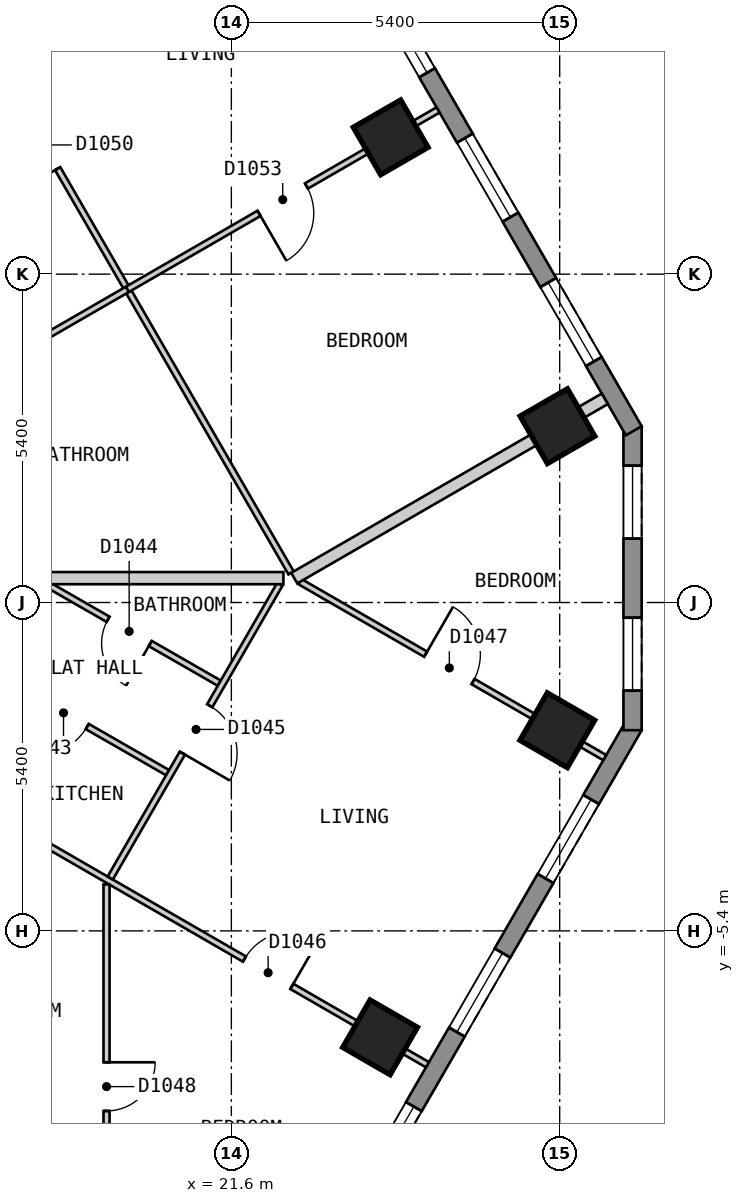
"""IFC4 building model, lengths in metres.
Left out: names, types, materials, properties, quantities, classifications, styles, units other than length and angle.
Written with IfcOpenShell. Run it as: python <this file> out.ifc"""

import sys

from ifc_helpers import new_model, si_unit, direction, frame, frame_2d, origin, origin_2d, place, context, subcontext, project, spatial, polyline, rectangle, outline, extrude, element, fill, save


model = new_model("IFC4")
c1 = context("Model", 3, precision=1e-05, world=origin(), true_north=direction((0.0, 1.0)))
c2 = subcontext(c1, "Body", "Model", "MODEL_VIEW")
j1 = project(units=[si_unit("LENGTHUNIT", "METRE"), si_unit("PLANEANGLEUNIT", "RADIAN")], contexts=[c1])
p1 = place(None, origin())
s1 = spatial("IfcSite", under=j1, at=p1, CompositionType="ELEMENT")
p2 = place(p1, origin())
s2 = spatial("IfcBuilding", under=s1, at=p2, CompositionType="ELEMENT")
p3 = place(p2, frame((0.0, 0.0, 120.6)))
s3 = spatial("IfcBuildingStorey", under=s2, at=p3, CompositionType="ELEMENT", Elevation=120.6)
for number, where, z_axis, x_axis in (
    (1, (24.046, -7.151, 0.0), (0.0, 0.0, 1.0), (0.5, 0.866, 0.0)),
    (2, (26.961, -2.101, 0.0), (0.0, 0.0, 1.0), (0.5, 0.866, 0.0)),
    (3, (26.963, 2.9, 0.0), (0.0, 0.0, 1.0), (-0.5, 0.866, 0.0)),
    (4, (24.22, 7.65, 0.0), (0.0, 0.0, 1.0), (-0.5, 0.866, 0.0)),
):
    element("IfcColumn", number, at=place(p3, frame(where, z_axis=z_axis, x_axis=x_axis)), inside=s3, PredefinedType="COLUMN", context=c2, shape_type="SweptSolid", body=[
        extrude(rectangle(XDim=0.9, YDim=0.9, at=origin_2d()), origin(), (0.0, 0.0, 1.0), 3.0),
    ])
p4 = place(p3, frame((15.862, -23.425, 0.0), z_axis=(0.0, 0.0, 1.0), x_axis=(0.500017503135, 0.866015298109, 0.0)))
e5 = element("IfcWall", 5, at=p4, inside=s3, PredefinedType="SOLIDWALL", context=c2, shape_type="SweptSolid", body=[
    extrude(outline(polyline([(0.0, -0.15), (24.711, -0.15), (24.631, 0.15), (0.08, 0.15), (0.0, -0.15)])), origin(), (0.0, 0.0, 1.0), 2.7),
])
p5 = place(p4, frame((1.4, 0.0, 0.15)))
e6 = element("IfcOpeningElement", 6, at=p5, cuts=e5, PredefinedType="OPENING", context=c2, shape_type="SweptSolid", body=[
    extrude(rectangle(XDim=1.5, YDim=2.1, at=frame_2d((0.75, 1.05))), frame((0.0, 0.16, 0.0), z_axis=(0.0, -1.0, 0.0), x_axis=(1.0, 0.0, 0.0)), (0.0, 0.0, 1.0), 0.32),
])
p6 = place(p4, frame((4.316, 0.0, 0.15)))
e7 = element("IfcOpeningElement", 7, at=p6, cuts=e5, PredefinedType="OPENING", context=c2, shape_type="SweptSolid", body=[
    extrude(rectangle(XDim=1.5, YDim=2.1, at=frame_2d((0.75, 1.05))), frame((0.0, 0.16, 0.0), z_axis=(0.0, -1.0, 0.0), x_axis=(1.0, 0.0, 0.0)), (0.0, 0.0, 1.0), 0.32),
])
p7 = place(p4, frame((7.231, 0.0, 0.15)))
e8 = element("IfcOpeningElement", 8, at=p7, cuts=e5, PredefinedType="OPENING", context=c2, shape_type="SweptSolid", body=[
    extrude(rectangle(XDim=1.5, YDim=2.1, at=frame_2d((0.75, 1.05))), frame((0.0, 0.16, 0.0), z_axis=(0.0, -1.0, 0.0), x_axis=(1.0, 0.0, 0.0)), (0.0, 0.0, 1.0), 0.32),
])
p8 = place(p4, frame((10.147, 0.0, 0.15)))
e9 = element("IfcOpeningElement", 9, at=p8, cuts=e5, PredefinedType="OPENING", context=c2, shape_type="SweptSolid", body=[
    extrude(rectangle(XDim=1.5, YDim=2.1, at=frame_2d((0.75, 1.05))), frame((0.0, 0.16, 0.0), z_axis=(0.0, -1.0, 0.0), x_axis=(1.0, 0.0, 0.0)), (0.0, 0.0, 1.0), 0.32),
])
p9 = place(p4, frame((13.062, 0.0, 0.15)))
e10 = element("IfcOpeningElement", 10, at=p9, cuts=e5, PredefinedType="OPENING", context=c2, shape_type="SweptSolid", body=[
    extrude(rectangle(XDim=1.5, YDim=2.1, at=frame_2d((0.75, 1.05))), frame((0.0, 0.16, 0.0), z_axis=(0.0, -1.0, 0.0), x_axis=(1.0, 0.0, 0.0)), (0.0, 0.0, 1.0), 0.32),
])
p10 = place(p4, frame((15.977, 0.0, 0.15)))
e11 = element("IfcOpeningElement", 11, at=p10, cuts=e5, PredefinedType="OPENING", context=c2, shape_type="SweptSolid", body=[
    extrude(rectangle(XDim=1.5, YDim=2.1, at=frame_2d((0.75, 1.05))), frame((0.0, 0.16, 0.0), z_axis=(0.0, -1.0, 0.0), x_axis=(1.0, 0.0, 0.0)), (0.0, 0.0, 1.0), 0.32),
])
p11 = place(p4, frame((18.893, 0.0, 0.15)))
e12 = element("IfcOpeningElement", 12, at=p11, cuts=e5, PredefinedType="OPENING", context=c2, shape_type="SweptSolid", body=[
    extrude(rectangle(XDim=1.5, YDim=2.1, at=frame_2d((0.75, 1.05))), frame((0.0, 0.16, 0.0), z_axis=(0.0, -1.0, 0.0), x_axis=(1.0, 0.0, 0.0)), (0.0, 0.0, 1.0), 0.32),
])
p12 = place(p4, frame((21.809, 0.0, 0.15)))
e13 = element("IfcOpeningElement", 13, at=p12, cuts=e5, PredefinedType="OPENING", context=c2, shape_type="SweptSolid", body=[
    extrude(rectangle(XDim=1.5, YDim=2.1, at=frame_2d((0.75, 1.05))), frame((0.0, 0.16, 0.0), z_axis=(0.0, -1.0, 0.0), x_axis=(1.0, 0.0, 0.0)), (0.0, 0.0, 1.0), 0.32),
])
p13 = place(p3, frame((28.198, -2.1, 0.0), z_axis=(0.0, 0.0, 1.0), x_axis=(0.0, 1.0, 0.0)))
e14 = element("IfcWall", 14, at=p13, inside=s3, PredefinedType="SOLIDWALL", context=c2, shape_type="SweptSolid", body=[
    extrude(outline(polyline([(0.0, -0.15), (5.0, -0.15), (4.92, 0.15), (0.08, 0.15), (0.0, -0.15)])), origin(), (0.0, 0.0, 1.0), 2.7),
])
p14 = place(p13, frame((0.65, 0.0, 0.15)))
e15 = element("IfcOpeningElement", 15, at=p14, cuts=e14, PredefinedType="OPENING", context=c2, shape_type="SweptSolid", body=[
    extrude(rectangle(XDim=1.2, YDim=2.1, at=frame_2d((0.6, 1.05))), frame((0.0, 0.16, 0.0), z_axis=(0.0, -1.0, 0.0), x_axis=(1.0, 0.0, 0.0)), (0.0, 0.0, 1.0), 0.32),
])
p15 = place(p13, frame((3.15, 0.0, 0.15)))
e16 = element("IfcOpeningElement", 16, at=p15, cuts=e14, PredefinedType="OPENING", context=c2, shape_type="SweptSolid", body=[
    extrude(rectangle(XDim=1.2, YDim=2.1, at=frame_2d((0.6, 1.05))), frame((0.0, 0.16, 0.0), z_axis=(0.0, -1.0, 0.0), x_axis=(1.0, 0.0, 0.0)), (0.0, 0.0, 1.0), 0.32),
])
p16 = place(p3, frame((28.218, 2.825, 0.0), z_axis=(0.0, 0.0, 1.0), x_axis=(-0.500020536353, 0.866013546791, 0.0)))
e17 = element("IfcWall", 17, at=p16, inside=s3, PredefinedType="SOLIDWALL", context=c2, shape_type="SweptSolid", body=[
    extrude(outline(polyline([(0.0, -0.15), (23.325, -0.15), (23.245, 0.15), (0.08, 0.15), (0.0, -0.15)])), origin(), (0.0, 0.0, 1.0), 2.7),
])
p17 = place(p16, frame((1.314, 0.0, 0.15)))
e18 = element("IfcOpeningElement", 18, at=p17, cuts=e17, PredefinedType="OPENING", context=c2, shape_type="SweptSolid", body=[
    extrude(rectangle(XDim=1.5, YDim=2.1, at=frame_2d((0.75, 1.05))), frame((0.0, 0.16, 0.0), z_axis=(0.0, -1.0, 0.0), x_axis=(1.0, 0.0, 0.0)), (0.0, 0.0, 1.0), 0.32),
])
p18 = place(p16, frame((4.056, 0.0, 0.15)))
e19 = element("IfcOpeningElement", 19, at=p18, cuts=e17, PredefinedType="OPENING", context=c2, shape_type="SweptSolid", body=[
    extrude(rectangle(XDim=1.5, YDim=2.1, at=frame_2d((0.75, 1.05))), frame((0.0, 0.16, 0.0), z_axis=(0.0, -1.0, 0.0), x_axis=(1.0, 0.0, 0.0)), (0.0, 0.0, 1.0), 0.32),
])
p19 = place(p16, frame((6.798, 0.0, 0.15)))
e20 = element("IfcOpeningElement", 20, at=p19, cuts=e17, PredefinedType="OPENING", context=c2, shape_type="SweptSolid", body=[
    extrude(rectangle(XDim=1.5, YDim=2.1, at=frame_2d((0.75, 1.05))), frame((0.0, 0.16, 0.0), z_axis=(0.0, -1.0, 0.0), x_axis=(1.0, 0.0, 0.0)), (0.0, 0.0, 1.0), 0.32),
])
p20 = place(p16, frame((9.541, 0.0, 0.15)))
e21 = element("IfcOpeningElement", 21, at=p20, cuts=e17, PredefinedType="OPENING", context=c2, shape_type="SweptSolid", body=[
    extrude(rectangle(XDim=1.5, YDim=2.1, at=frame_2d((0.75, 1.05))), frame((0.0, 0.16, 0.0), z_axis=(0.0, -1.0, 0.0), x_axis=(1.0, 0.0, 0.0)), (0.0, 0.0, 1.0), 0.32),
])
p21 = place(p16, frame((12.284, 0.0, 0.15)))
e22 = element("IfcOpeningElement", 22, at=p21, cuts=e17, PredefinedType="OPENING", context=c2, shape_type="SweptSolid", body=[
    extrude(rectangle(XDim=1.5, YDim=2.1, at=frame_2d((0.75, 1.05))), frame((0.0, 0.16, 0.0), z_axis=(0.0, -1.0, 0.0), x_axis=(1.0, 0.0, 0.0)), (0.0, 0.0, 1.0), 0.32),
])
p22 = place(p16, frame((15.027, 0.0, 0.15)))
e23 = element("IfcOpeningElement", 23, at=p22, cuts=e17, PredefinedType="OPENING", context=c2, shape_type="SweptSolid", body=[
    extrude(rectangle(XDim=1.5, YDim=2.1, at=frame_2d((0.75, 1.05))), frame((0.0, 0.16, 0.0), z_axis=(0.0, -1.0, 0.0), x_axis=(1.0, 0.0, 0.0)), (0.0, 0.0, 1.0), 0.32),
])
p23 = place(p16, frame((17.769, 0.0, 0.15)))
e24 = element("IfcOpeningElement", 24, at=p23, cuts=e17, PredefinedType="OPENING", context=c2, shape_type="SweptSolid", body=[
    extrude(rectangle(XDim=1.5, YDim=2.1, at=frame_2d((0.75, 1.05))), frame((0.0, 0.16, 0.0), z_axis=(0.0, -1.0, 0.0), x_axis=(1.0, 0.0, 0.0)), (0.0, 0.0, 1.0), 0.32),
])
p24 = place(p16, frame((20.511, 0.0, 0.15)))
e25 = element("IfcOpeningElement", 25, at=p24, cuts=e17, PredefinedType="OPENING", context=c2, shape_type="SweptSolid", body=[
    extrude(rectangle(XDim=1.5, YDim=2.1, at=frame_2d((0.75, 1.05))), frame((0.0, 0.16, 0.0), z_axis=(0.0, -1.0, 0.0), x_axis=(1.0, 0.0, 0.0)), (0.0, 0.0, 1.0), 0.32),
])
p25 = place(p3, frame((14.455, 14.563, 0.0), z_axis=(0.0, 0.0, 1.0), x_axis=(0.500009803579, -0.866019743612, 0.0)))
e26 = element("IfcWall", 26, at=p25, inside=s3, PredefinedType="PARTITIONING", context=c2, shape_type="SweptSolid", body=[
    extrude(rectangle(XDim=16.254, YDim=0.1, at=frame_2d((8.127, 0.0))), origin(), (0.0, 0.0, 1.0), 2.7),
])
p26 = place(p25, frame((7.677, 0.0, 0.0)))
e27 = element("IfcOpeningElement", 27, at=p26, cuts=e26, PredefinedType="OPENING", context=c2, shape_type="SweptSolid", body=[
    extrude(rectangle(XDim=0.9, YDim=2.1, at=frame_2d((0.45, 1.05))), frame((0.0, 0.06, 0.0), z_axis=(0.0, -1.0, 0.0), x_axis=(1.0, 0.0, 0.0)), (0.0, 0.0, 1.0), 0.12),
])
p27 = place(p3, frame((16.165, -2.601, 0.0), z_axis=(0.0, 0.0, 1.0), x_axis=(0.866016855193, -0.500014806302, 0.0)))
e28 = element("IfcWall", 28, at=p27, inside=s3, PredefinedType="PARTITIONING", context=c2, shape_type="SweptSolid", body=[
    extrude(rectangle(XDim=10.0, YDim=0.1, at=frame_2d((5.0, 0.0))), origin(), (0.0, 0.0, 1.0), 2.7),
])
p28 = place(p27, frame((6.524, 0.0, 0.0)))
e29 = element("IfcOpeningElement", 29, at=p28, cuts=e28, PredefinedType="OPENING", context=c2, shape_type="SweptSolid", body=[
    extrude(rectangle(XDim=0.9, YDim=2.1, at=frame_2d((0.45, 1.05))), frame((0.0, 0.06, 0.0), z_axis=(0.0, -1.0, 0.0), x_axis=(1.0, 0.0, 0.0)), (0.0, 0.0, 1.0), 0.12),
])
p29 = place(p3, frame((17.171, -0.857, 0.0), z_axis=(0.0, 0.0, 1.0), x_axis=(0.867173455867, -0.49800622229, 0.0)))
e30 = element("IfcWall", 30, at=p29, inside=s3, PredefinedType="PARTITIONING", context=c2, shape_type="SweptSolid", body=[
    extrude(rectangle(XDim=3.898, YDim=0.1, at=frame_2d((1.949, 0.0))), origin(), (0.0, 0.0, 1.0), 2.7),
])
p30 = place(p29, frame((1.474, 0.0, 0.0)))
e31 = element("IfcOpeningElement", 31, at=p30, cuts=e30, PredefinedType="OPENING", context=c2, shape_type="SweptSolid", body=[
    extrude(rectangle(XDim=0.9, YDim=2.1, at=frame_2d((0.45, 1.05))), frame((0.0, 0.06, 0.0), z_axis=(0.0, -1.0, 0.0), x_axis=(1.0, 0.0, 0.0)), (0.0, 0.0, 1.0), 0.12),
])
p31 = place(p3, frame((18.568, 0.301, 0.0), z_axis=(0.0, 0.0, 1.0), x_axis=(0.867155675456, -0.49803718187, 0.0)))
e32 = element("IfcWall", 32, at=p31, inside=s3, PredefinedType="PARTITIONING", context=c2, shape_type="SweptSolid", body=[
    extrude(rectangle(XDim=3.267, YDim=0.1, at=frame_2d((1.633, 0.0))), origin(), (0.0, 0.0, 1.0), 2.7),
])
p32 = place(p31, frame((1.158, 0.0, 0.0)))
e33 = element("IfcOpeningElement", 33, at=p32, cuts=e32, PredefinedType="OPENING", context=c2, shape_type="SweptSolid", body=[
    extrude(rectangle(XDim=0.8, YDim=2.1, at=frame_2d((0.4, 1.05))), frame((0.0, 0.06, 0.0), z_axis=(0.0, -1.0, 0.0), x_axis=(1.0, 0.0, 0.0)), (0.0, 0.0, 1.0), 0.12),
])
p33 = place(p3, frame((22.729, 0.343, 0.0), z_axis=(0.0, 0.0, 1.0), x_axis=(0.865996608848, -0.500049870977, 0.0)))
e34 = element("IfcWall", 34, at=p33, inside=s3, PredefinedType="PARTITIONING", context=c2, shape_type="SweptSolid", body=[
    extrude(rectangle(XDim=5.788, YDim=0.1, at=frame_2d((2.894, 0.0))), origin(), (0.0, 0.0, 1.0), 2.7),
])
p34 = place(p33, frame((2.386, 0.0, 0.0)))
e35 = element("IfcOpeningElement", 35, at=p34, cuts=e34, PredefinedType="OPENING", context=c2, shape_type="SweptSolid", body=[
    extrude(rectangle(XDim=0.9, YDim=2.1, at=frame_2d((0.45, 1.05))), frame((0.0, 0.06, 0.0), z_axis=(0.0, -1.0, 0.0), x_axis=(1.0, 0.0, 0.0)), (0.0, 0.0, 1.0), 0.12),
])
p35 = place(p3, frame((19.608, -4.531, 0.0), z_axis=(0.0, 0.0, 1.0), x_axis=(0.500035555316, 0.86600487494, 0.0)))
e36 = element("IfcWall", 36, at=p35, inside=s3, PredefinedType="PARTITIONING", context=c2, shape_type="SweptSolid", body=[
    extrude(rectangle(XDim=5.58, YDim=0.1, at=frame_2d((2.79, 0.0))), origin(), (0.0, 0.0, 1.0), 2.7),
])
p36 = place(p35, frame((2.372, 0.0, 0.0)))
e37 = element("IfcOpeningElement", 37, at=p36, cuts=e36, PredefinedType="OPENING", context=c2, shape_type="SweptSolid", body=[
    extrude(rectangle(XDim=0.9, YDim=2.1, at=frame_2d((0.45, 1.05))), frame((0.0, 0.06, 0.0), z_axis=(0.0, -1.0, 0.0), x_axis=(1.0, 0.0, 0.0)), (0.0, 0.0, 1.0), 0.12),
])
p37 = place(p3, frame((19.547, -11.171, 0.0), z_axis=(0.0, 0.0, 1.0), x_axis=(0.0, 1.0, 0.0)))
e38 = element("IfcWall", 38, at=p37, inside=s3, PredefinedType="PARTITIONING", context=c2, shape_type="SweptSolid", body=[
    extrude(rectangle(XDim=6.534, YDim=0.1, at=frame_2d((3.267, 0.0))), origin(), (0.0, 0.0, 1.0), 2.7),
])
p38 = place(p37, frame((2.81, 0.0, 0.0)))
e39 = element("IfcOpeningElement", 39, at=p38, cuts=e38, PredefinedType="OPENING", context=c2, shape_type="SweptSolid", body=[
    extrude(rectangle(XDim=0.8, YDim=2.1, at=frame_2d((0.4, 1.05))), frame((0.0, 0.06, 0.0), z_axis=(0.0, -1.0, 0.0), x_axis=(1.0, 0.0, 0.0)), (0.0, 0.0, 1.0), 0.12),
])
p39 = place(p3, frame((16.339, 3.1, 0.0), z_axis=(0.0, 0.0, 1.0), x_axis=(0.866050731258, 0.499956128963, 0.0)))
e40 = element("IfcWall", 40, at=p39, inside=s3, PredefinedType="PARTITIONING", context=c2, shape_type="SweptSolid", body=[
    extrude(rectangle(XDim=4.1, YDim=0.1, at=frame_2d((2.05, 0.0))), origin(), (0.0, 0.0, 1.0), 2.7),
])
p40 = place(p39, frame((1.6, 0.0, 0.0)))
e41 = element("IfcOpeningElement", 41, at=p40, cuts=e40, PredefinedType="OPENING", context=c2, shape_type="SweptSolid", body=[
    extrude(rectangle(XDim=0.8, YDim=2.1, at=frame_2d((0.4, 1.05))), frame((0.0, 0.06, 0.0), z_axis=(0.0, -1.0, 0.0), x_axis=(1.0, 0.0, 0.0)), (0.0, 0.0, 1.0), 0.12),
])
p41 = place(p3, frame((17.782, 0.401, 0.0), z_axis=(0.0, 0.0, 1.0), x_axis=(1.0, 0.0, 0.0)))
e42 = element("IfcWall", 42, at=p41, inside=s3, PredefinedType="PARTITIONING", context=c2, shape_type="SweptSolid", body=[
    extrude(rectangle(XDim=4.674, YDim=0.2, at=frame_2d((2.337, 0.0))), origin(), (0.0, 0.0, 1.0), 2.7),
])
p42 = place(p3, frame((22.634, 0.401, 0.0), z_axis=(0.0, 0.0, 1.0), x_axis=(0.86601325737, 0.500021037617, 0.0)))
e43 = element("IfcWall", 43, at=p42, inside=s3, PredefinedType="PARTITIONING", context=c2, shape_type="SweptSolid", body=[
    extrude(rectangle(XDim=5.898, YDim=0.2, at=frame_2d((2.949, 0.0))), origin(), (0.0, 0.0, 1.0), 2.7),
])
p43 = place(p3, frame((19.89, 5.15, 0.0), z_axis=(0.0, 0.0, 1.0), x_axis=(0.865993310977, 0.500055582255, 0.0)))
e44 = element("IfcWall", 44, at=p43, inside=s3, PredefinedType="PARTITIONING", context=c2, shape_type="SweptSolid", body=[
    extrude(rectangle(XDim=5.9, YDim=0.1, at=frame_2d((2.95, 0.0))), origin(), (0.0, 0.0, 1.0), 2.7),
])
p44 = place(p43, frame((2.5, 0.0, 0.0)))
e45 = element("IfcOpeningElement", 45, at=p44, cuts=e44, PredefinedType="OPENING", context=c2, shape_type="SweptSolid", body=[
    extrude(rectangle(XDim=0.9, YDim=2.1, at=frame_2d((0.45, 1.05))), frame((0.0, 0.06, 0.0), z_axis=(0.0, -1.0, 0.0), x_axis=(1.0, 0.0, 0.0)), (0.0, 0.0, 1.0), 0.12),
])
p45 = place(p10, origin())
e46 = element("IfcWindow", 46, at=p45, inside=s3, PartitioningType="SINGLE_PANEL", PredefinedType="WINDOW", context=c2, shape_type="SweptSolid", body=[
    extrude(rectangle(XDim=1.5, YDim=2.1, at=frame_2d((0.75, 1.05))), frame((0.0, 0.03, 0.0), z_axis=(0.0, -1.0, 0.0), x_axis=(1.0, 0.0, 0.0)), (0.0, 0.0, 1.0), 0.06),
])
fill(e11, e46)
p46 = place(p11, origin())
e47 = element("IfcWindow", 47, at=p46, inside=s3, PartitioningType="SINGLE_PANEL", PredefinedType="WINDOW", context=c2, shape_type="SweptSolid", body=[
    extrude(rectangle(XDim=1.5, YDim=2.1, at=frame_2d((0.75, 1.05))), frame((0.0, 0.03, 0.0), z_axis=(0.0, -1.0, 0.0), x_axis=(1.0, 0.0, 0.0)), (0.0, 0.0, 1.0), 0.06),
])
fill(e12, e47)
p47 = place(p12, origin())
e48 = element("IfcWindow", 48, at=p47, inside=s3, PartitioningType="SINGLE_PANEL", PredefinedType="WINDOW", context=c2, shape_type="SweptSolid", body=[
    extrude(rectangle(XDim=1.5, YDim=2.1, at=frame_2d((0.75, 1.05))), frame((0.0, 0.03, 0.0), z_axis=(0.0, -1.0, 0.0), x_axis=(1.0, 0.0, 0.0)), (0.0, 0.0, 1.0), 0.06),
])
fill(e13, e48)
p48 = place(p14, origin())
e49 = element("IfcWindow", 49, at=p48, inside=s3, PartitioningType="SINGLE_PANEL", PredefinedType="WINDOW", context=c2, shape_type="SweptSolid", body=[
    extrude(rectangle(XDim=1.2, YDim=2.1, at=frame_2d((0.6, 1.05))), frame((0.0, 0.03, 0.0), z_axis=(0.0, -1.0, 0.0), x_axis=(1.0, 0.0, 0.0)), (0.0, 0.0, 1.0), 0.06),
])
fill(e15, e49)
p49 = place(p15, origin())
e50 = element("IfcWindow", 50, at=p49, inside=s3, PartitioningType="SINGLE_PANEL", PredefinedType="WINDOW", context=c2, shape_type="SweptSolid", body=[
    extrude(rectangle(XDim=1.2, YDim=2.1, at=frame_2d((0.6, 1.05))), frame((0.0, 0.03, 0.0), z_axis=(0.0, -1.0, 0.0), x_axis=(1.0, 0.0, 0.0)), (0.0, 0.0, 1.0), 0.06),
])
fill(e16, e50)
p50 = place(p17, origin())
e51 = element("IfcWindow", 51, at=p50, inside=s3, PartitioningType="SINGLE_PANEL", PredefinedType="WINDOW", context=c2, shape_type="SweptSolid", body=[
    extrude(rectangle(XDim=1.5, YDim=2.1, at=frame_2d((0.75, 1.05))), frame((0.0, 0.03, 0.0), z_axis=(0.0, -1.0, 0.0), x_axis=(1.0, 0.0, 0.0)), (0.0, 0.0, 1.0), 0.06),
])
fill(e18, e51)
p51 = place(p18, origin())
e52 = element("IfcWindow", 52, at=p51, inside=s3, PartitioningType="SINGLE_PANEL", PredefinedType="WINDOW", context=c2, shape_type="SweptSolid", body=[
    extrude(rectangle(XDim=1.5, YDim=2.1, at=frame_2d((0.75, 1.05))), frame((0.0, 0.03, 0.0), z_axis=(0.0, -1.0, 0.0), x_axis=(1.0, 0.0, 0.0)), (0.0, 0.0, 1.0), 0.06),
])
fill(e19, e52)
p52 = place(p19, origin())
e53 = element("IfcWindow", 53, at=p52, inside=s3, PartitioningType="SINGLE_PANEL", PredefinedType="WINDOW", context=c2, shape_type="SweptSolid", body=[
    extrude(rectangle(XDim=1.5, YDim=2.1, at=frame_2d((0.75, 1.05))), frame((0.0, 0.03, 0.0), z_axis=(0.0, -1.0, 0.0), x_axis=(1.0, 0.0, 0.0)), (0.0, 0.0, 1.0), 0.06),
])
fill(e20, e53)
p53 = place(p30, origin())
e54 = element("IfcDoor", 54, at=p53, inside=s3, OperationType="SINGLE_SWING_LEFT", PredefinedType="DOOR", context=c2, shape_type="SweptSolid", body=[
    extrude(rectangle(XDim=0.9, YDim=2.1, at=frame_2d((0.45, 1.05))), frame((0.0, 0.025, 0.0), z_axis=(0.0, -1.0, 0.0), x_axis=(1.0, 0.0, 0.0)), (0.0, 0.0, 1.0), 0.05),
])
fill(e31, e54)
p54 = place(p32, origin())
e55 = element("IfcDoor", 55, at=p54, inside=s3, OperationType="SINGLE_SWING_RIGHT", PredefinedType="DOOR", context=c2, shape_type="SweptSolid", body=[
    extrude(rectangle(XDim=0.8, YDim=2.1, at=frame_2d((0.4, 1.05))), frame((0.0, 0.025, 0.0), z_axis=(0.0, -1.0, 0.0), x_axis=(1.0, 0.0, 0.0)), (0.0, 0.0, 1.0), 0.05),
])
fill(e33, e55)
p55 = place(p36, origin())
e56 = element("IfcDoor", 56, at=p55, inside=s3, OperationType="SINGLE_SWING_LEFT", PredefinedType="DOOR", context=c2, shape_type="SweptSolid", body=[
    extrude(rectangle(XDim=0.9, YDim=2.1, at=frame_2d((0.45, 1.05))), frame((0.0, 0.025, 0.0), z_axis=(0.0, -1.0, 0.0), x_axis=(1.0, 0.0, 0.0)), (0.0, 0.0, 1.0), 0.05),
])
fill(e37, e56)
p56 = place(p28, origin())
e57 = element("IfcDoor", 57, at=p56, inside=s3, OperationType="SINGLE_SWING_RIGHT", PredefinedType="DOOR", context=c2, shape_type="SweptSolid", body=[
    extrude(rectangle(XDim=0.9, YDim=2.1, at=frame_2d((0.45, 1.05))), frame((0.0, 0.025, 0.0), z_axis=(0.0, -1.0, 0.0), x_axis=(1.0, 0.0, 0.0)), (0.0, 0.0, 1.0), 0.05),
])
fill(e29, e57)
p57 = place(p34, origin())
e58 = element("IfcDoor", 58, at=p57, inside=s3, OperationType="SINGLE_SWING_LEFT", PredefinedType="DOOR", context=c2, shape_type="SweptSolid", body=[
    extrude(rectangle(XDim=0.9, YDim=2.1, at=frame_2d((0.45, 1.05))), frame((0.0, 0.025, 0.0), z_axis=(0.0, -1.0, 0.0), x_axis=(1.0, 0.0, 0.0)), (0.0, 0.0, 1.0), 0.05),
])
fill(e35, e58)
p58 = place(p38, origin())
e59 = element("IfcDoor", 59, at=p58, inside=s3, OperationType="SINGLE_SWING_RIGHT", PredefinedType="DOOR", context=c2, shape_type="SweptSolid", body=[
    extrude(rectangle(XDim=0.8, YDim=2.1, at=frame_2d((0.4, 1.05))), frame((0.0, 0.025, 0.0), z_axis=(0.0, -1.0, 0.0), x_axis=(1.0, 0.0, 0.0)), (0.0, 0.0, 1.0), 0.05),
])
fill(e39, e59)
p59 = place(p26, origin())
e60 = element("IfcDoor", 60, at=p59, inside=s3, OperationType="SINGLE_SWING_RIGHT", PredefinedType="DOOR", context=c2, shape_type="SweptSolid", body=[
    extrude(rectangle(XDim=0.9, YDim=2.1, at=frame_2d((0.45, 1.05))), frame((0.0, 0.025, 0.0), z_axis=(0.0, -1.0, 0.0), x_axis=(1.0, 0.0, 0.0)), (0.0, 0.0, 1.0), 0.05),
])
fill(e27, e60)
p60 = place(p44, origin())
e61 = element("IfcDoor", 61, at=p60, inside=s3, OperationType="SINGLE_SWING_LEFT", PredefinedType="DOOR", context=c2, shape_type="SweptSolid", body=[
    extrude(rectangle(XDim=0.9, YDim=2.1, at=frame_2d((0.45, 1.05))), frame((0.0, 0.025, 0.0), z_axis=(0.0, -1.0, 0.0), x_axis=(1.0, 0.0, 0.0)), (0.0, 0.0, 1.0), 0.05),
])
fill(e45, e61)
save(model, sys.argv[1])
